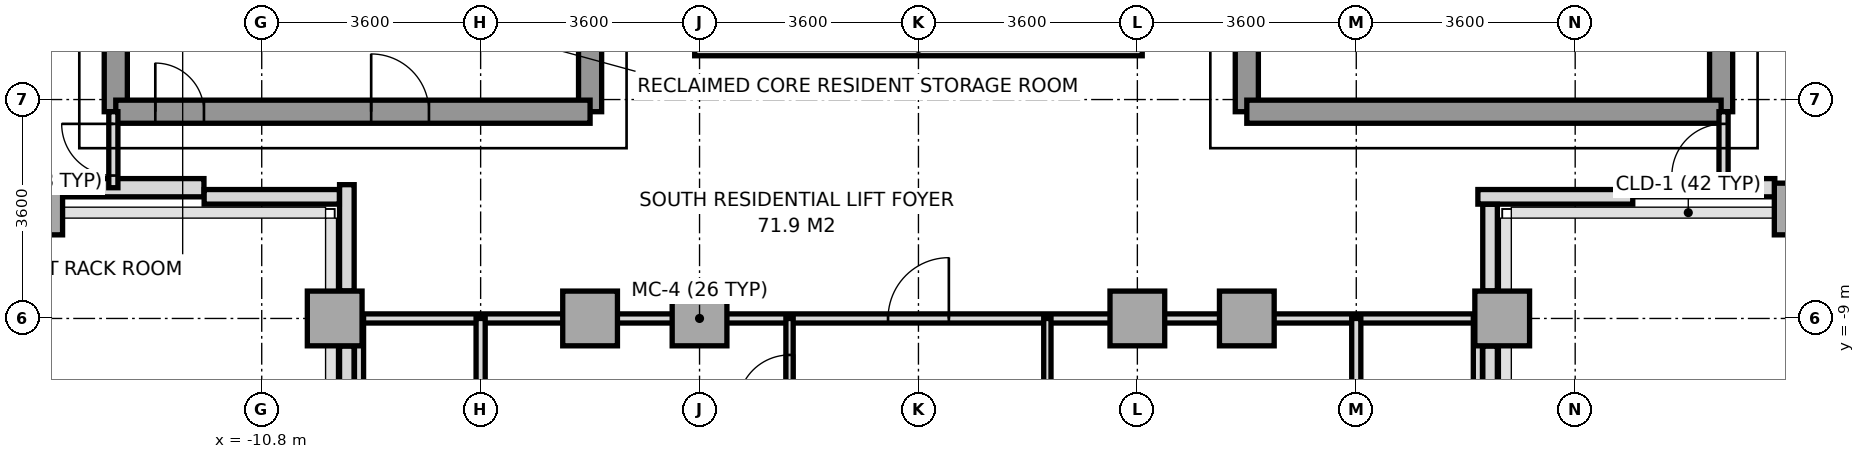
"""IFC4 building model, lengths in metres.
Left out: names, types, materials, properties, quantities, classifications, styles, units other than length and angle.
Written with IfcOpenShell. Run it as: python <this file> out.ifc"""

import sys

from ifc_helpers import new_model, si_unit, direction, frame, frame_2d, origin, origin_2d, place, context, subcontext, project, spatial, rectangle, extrude, source, transform, mapped, element, fill, save


model = new_model("IFC4")
c1 = context("Model", 3, precision=1e-05, world=origin(), true_north=direction((0.0, 1.0)))
c2 = subcontext(c1, "Body", "Model", "MODEL_VIEW")
j1 = project(units=[si_unit("LENGTHUNIT", "METRE"), si_unit("PLANEANGLEUNIT", "RADIAN")], contexts=[c1])
p1 = place(None, origin())
s1 = spatial("IfcSite", under=j1, at=p1, CompositionType="ELEMENT")
p2 = place(p1, origin())
s2 = spatial("IfcBuilding", under=s1, at=p2, CompositionType="ELEMENT")
p3 = place(p2, frame((0.0, 0.0, 211.4)))
s3 = spatial("IfcBuildingStorey", under=s2, at=p3, CompositionType="ELEMENT", Elevation=211.4)
m1 = source(origin(), c2, "Body", "SweptSolid", [
    extrude(rectangle(XDim=0.65, YDim=0.85, at=origin_2d()), origin(), (0.0, 0.0, 1.0), 3.14),
])
p4 = place(p3, frame((-14.4, -7.2, 0.0), z_axis=(0.0, 0.0, 1.0), x_axis=(1.0, 0.0, 0.0)))
e1 = element("IfcColumn", 1, at=p4, inside=s3, PredefinedType="COLUMN", context=c2, shape_type="MappedRepresentation", body=[
    mapped(m1, transform((0.0, 0.0, 0.0), x_axis=(1.0, 0.0, 0.0), y_axis=(0.0, 1.0, 0.0), z_axis=(0.0, 0.0, 1.0), scale=1.0)),
])
m2 = source(origin(), c2, "Body", "SweptSolid", [
    extrude(rectangle(XDim=0.9, YDim=0.9, at=origin_2d()), origin(), (0.0, 0.0, 1.0), 3.14),
])
for number, where, z_axis, x_axis in (
    (2, (-9.6, -9.0, 0.0), (0.0, 0.0, 1.0), (1.0, 0.0, 0.0)),
    (3, (-5.4, -9.0, 0.0), (0.0, 0.0, 1.0), (1.0, 0.0, 0.0)),
    (4, (-3.6, -9.0, 0.0), (0.0, 0.0, 1.0), (1.0, 0.0, 0.0)),
    (5, (3.6, -9.0, 0.0), (0.0, 0.0, 1.0), (1.0, 0.0, 0.0)),
    (6, (5.4, -9.0, 0.0), (0.0, 0.0, 1.0), (1.0, 0.0, 0.0)),
    (7, (9.6, -9.0, 0.0), (0.0, 0.0, 1.0), (1.0, 0.0, 0.0)),
):
    element("IfcColumn", number, at=place(p3, frame(where, z_axis=z_axis, x_axis=x_axis)), inside=s3, PredefinedType="COLUMN", context=c2, shape_type="MappedRepresentation", body=[
        mapped(m2, transform((0.0, 0.0, 0.0), x_axis=(1.0, 0.0, 0.0), y_axis=(0.0, 1.0, 0.0), z_axis=(0.0, 0.0, 1.0), scale=1.0)),
    ])
p5 = place(p3, frame((14.4, -7.2, 0.0), z_axis=(0.0, 0.0, 1.0), x_axis=(1.0, 0.0, 0.0)))
e8 = element("IfcColumn", 8, at=p5, inside=s3, PredefinedType="COLUMN", context=c2, shape_type="MappedRepresentation", body=[
    mapped(m1, transform((0.0, 0.0, 0.0), x_axis=(1.0, 0.0, 0.0), y_axis=(0.0, 1.0, 0.0), z_axis=(0.0, 0.0, 1.0), scale=1.0)),
])
for number, where, z_axis, x_axis in (
    (9, (-14.083, -6.85, 0.0), (0.0, 0.0, 1.0), (1.0, 0.0, 0.0)),
    (10, (11.75, -6.85, 0.0), (0.0, 0.0, 1.0), (1.0, 0.0, 0.0)),
):
    element("IfcWall", number, at=place(p3, frame(where, z_axis=z_axis, x_axis=x_axis)), inside=s3, PredefinedType="SOLIDWALL", context=c2, shape_type="SweptSolid", body=[
        extrude(rectangle(XDim=2.333, YDim=0.3, at=frame_2d((1.167, 0.0))), origin(), (0.0, 0.0, 1.0), 3.14),
    ])
p6 = place(p3, frame((11.747, -7.0, 0.0), z_axis=(0.0, 0.0, 1.0), x_axis=(-1.0, 0.0, 0.0)))
e11 = element("IfcWall", 11, at=p6, inside=s3, PredefinedType="PARAPET", context=c2, shape_type="SweptSolid", body=[
    extrude(rectangle(XDim=2.547, YDim=0.24, at=frame_2d((1.273, 0.0))), origin(), (0.0, 0.0, 1.0), 1.15),
])
p7 = place(p3, frame((9.4, -7.123, 0.0), z_axis=(0.0, 0.0, 1.0), x_axis=(0.0, -1.0, 0.0)))
e12 = element("IfcWall", 12, at=p7, inside=s3, PredefinedType="PARAPET", context=c2, shape_type="SweptSolid", body=[
    extrude(rectangle(XDim=1.424, YDim=0.24, at=frame_2d((0.712, 0.0))), origin(), (0.0, 0.0, 1.0), 1.15),
])
p8 = place(p3, frame((9.4, -9.453, 0.0), z_axis=(0.0, 0.0, 1.0), x_axis=(0.0, -1.0, 0.0)))
e13 = element("IfcWall", 13, at=p8, inside=s3, PredefinedType="PARAPET", context=c2, shape_type="SweptSolid", body=[
    extrude(rectangle(XDim=6.15, YDim=0.24, at=frame_2d((3.075, 0.0))), origin(), (0.0, 0.0, 1.0), 1.15),
])
p9 = place(p3, frame((-9.4, -15.358, 0.0), z_axis=(0.0, 0.0, 1.0), x_axis=(0.0, 1.0, 0.0)))
e14 = element("IfcWall", 14, at=p9, inside=s3, PredefinedType="PARAPET", context=c2, shape_type="SweptSolid", body=[
    extrude(rectangle(XDim=5.905, YDim=0.24, at=frame_2d((2.952, 0.0))), origin(), (0.0, 0.0, 1.0), 1.15),
])
p10 = place(p3, frame((-9.4, -8.547, 0.0), z_axis=(0.0, 0.0, 1.0), x_axis=(0.0, 1.0, 0.0)))
e15 = element("IfcWall", 15, at=p10, inside=s3, PredefinedType="PARAPET", context=c2, shape_type="SweptSolid", body=[
    extrude(rectangle(XDim=1.747, YDim=0.24, at=frame_2d((0.874, 0.0))), origin(), (0.0, 0.0, 1.0), 1.15),
])
p11 = place(p3, frame((-9.523, -7.0, 0.0), z_axis=(0.0, 0.0, 1.0), x_axis=(-1.0, 0.0, 0.0)))
e16 = element("IfcWall", 16, at=p11, inside=s3, PredefinedType="PARAPET", context=c2, shape_type="SweptSolid", body=[
    extrude(rectangle(XDim=2.224, YDim=0.24, at=frame_2d((1.112, 0.0))), origin(), (0.0, 0.0, 1.0), 1.15),
])
p12 = place(p3, frame((-13.2, -5.6, 0.0), z_axis=(0.0, 0.0, 1.0), x_axis=(0.0, 1.0, 0.0)))
e17 = element("IfcWall", 17, at=p12, inside=s3, PredefinedType="SHEAR", context=c2, shape_type="SweptSolid", body=[
    extrude(rectangle(XDim=11.2, YDim=0.38, at=frame_2d((5.6, 0.0))), origin(), (0.0, 0.0, 1.0), 3.14),
])
p13 = place(p3, frame((-5.4, -5.6, 0.0), z_axis=(0.0, 0.0, 1.0), x_axis=(0.0, 1.0, 0.0)))
e18 = element("IfcWall", 18, at=p13, inside=s3, PredefinedType="SHEAR", context=c2, shape_type="SweptSolid", body=[
    extrude(rectangle(XDim=12.5, YDim=0.38, at=frame_2d((6.25, 0.0))), origin(), (0.0, 0.0, 1.0), 3.14),
])
p14 = place(p13, frame((4.55, 0.0, 0.0)))
e19 = element("IfcOpeningElement", 19, at=p14, cuts=e18, PredefinedType="OPENING", context=c2, shape_type="SweptSolid", body=[
    extrude(rectangle(XDim=1.2, YDim=2.2, at=frame_2d((0.6, 1.1))), frame((0.0, 0.2, 0.0), z_axis=(0.0, -1.0, 0.0), x_axis=(1.0, 0.0, 0.0)), (0.0, 0.0, 1.0), 0.4),
])
p15 = place(p13, frame((10.45, 0.0, 0.0)))
e20 = element("IfcOpeningElement", 20, at=p15, cuts=e18, PredefinedType="OPENING", context=c2, shape_type="SweptSolid", body=[
    extrude(rectangle(XDim=1.2, YDim=2.2, at=frame_2d((0.6, 1.1))), frame((0.0, 0.2, 0.0), z_axis=(0.0, -1.0, 0.0), x_axis=(1.0, 0.0, 0.0)), (0.0, 0.0, 1.0), 0.4),
])
p16 = place(p13, frame((6.86, 0.0, 0.0)))
e21 = element("IfcOpeningElement", 21, at=p16, cuts=e18, PredefinedType="OPENING", context=c2, shape_type="SweptSolid", body=[
    extrude(rectangle(XDim=0.8, YDim=2.1, at=frame_2d((0.4, 1.05))), frame((0.0, 0.2, 0.0), z_axis=(0.0, -1.0, 0.0), x_axis=(1.0, 0.0, 0.0)), (0.0, 0.0, 1.0), 0.4),
])
p17 = place(p3, frame((-13.2, -5.6, 0.0), z_axis=(0.0, 0.0, 1.0), x_axis=(1.0, 0.0, 0.0)))
e22 = element("IfcWall", 22, at=p17, inside=s3, PredefinedType="SHEAR", context=c2, shape_type="SweptSolid", body=[
    extrude(rectangle(XDim=7.8, YDim=0.38, at=frame_2d((3.9, 0.0))), origin(), (0.0, 0.0, 1.0), 3.14),
])
p18 = place(p17, frame((0.65, 0.0, 0.0)))
e23 = element("IfcOpeningElement", 23, at=p18, cuts=e22, PredefinedType="OPENING", context=c2, shape_type="SweptSolid", body=[
    extrude(rectangle(XDim=0.8, YDim=2.1, at=frame_2d((0.4, 1.05))), frame((0.0, 0.2, 0.0), z_axis=(0.0, -1.0, 0.0), x_axis=(1.0, 0.0, 0.0)), (0.0, 0.0, 1.0), 0.4),
])
p19 = place(p17, frame((4.2, 0.0, 0.0)))
e24 = element("IfcOpeningElement", 24, at=p19, cuts=e22, PredefinedType="OPENING", context=c2, shape_type="SweptSolid", body=[
    extrude(rectangle(XDim=0.95, YDim=2.15, at=frame_2d((0.475, 1.075))), frame((0.0, 0.2, 0.0), z_axis=(0.0, -1.0, 0.0), x_axis=(1.0, 0.0, 0.0)), (0.0, 0.0, 1.0), 0.4),
])
p20 = place(p3, frame((13.2, -5.6, 0.0), z_axis=(0.0, 0.0, 1.0), x_axis=(0.0, 1.0, 0.0)))
e25 = element("IfcWall", 25, at=p20, inside=s3, PredefinedType="SHEAR", context=c2, shape_type="SweptSolid", body=[
    extrude(rectangle(XDim=11.2, YDim=0.38, at=frame_2d((5.6, 0.0))), origin(), (0.0, 0.0, 1.0), 3.14),
])
p21 = place(p3, frame((5.4, -5.6, 0.0), z_axis=(0.0, 0.0, 1.0), x_axis=(0.0, 1.0, 0.0)))
e26 = element("IfcWall", 26, at=p21, inside=s3, PredefinedType="SHEAR", context=c2, shape_type="SweptSolid", body=[
    extrude(rectangle(XDim=12.5, YDim=0.38, at=frame_2d((6.25, 0.0))), origin(), (0.0, 0.0, 1.0), 3.14),
])
p22 = place(p21, frame((4.55, 0.0, 0.0)))
e27 = element("IfcOpeningElement", 27, at=p22, cuts=e26, PredefinedType="OPENING", context=c2, shape_type="SweptSolid", body=[
    extrude(rectangle(XDim=1.2, YDim=2.2, at=frame_2d((0.6, 1.1))), frame((0.0, 0.2, 0.0), z_axis=(0.0, -1.0, 0.0), x_axis=(1.0, 0.0, 0.0)), (0.0, 0.0, 1.0), 0.4),
])
p23 = place(p21, frame((10.45, 0.0, 0.0)))
e28 = element("IfcOpeningElement", 28, at=p23, cuts=e26, PredefinedType="OPENING", context=c2, shape_type="SweptSolid", body=[
    extrude(rectangle(XDim=1.2, YDim=2.2, at=frame_2d((0.6, 1.1))), frame((0.0, 0.2, 0.0), z_axis=(0.0, -1.0, 0.0), x_axis=(1.0, 0.0, 0.0)), (0.0, 0.0, 1.0), 0.4),
])
p24 = place(p21, frame((6.86, 0.0, 0.0)))
e29 = element("IfcOpeningElement", 29, at=p24, cuts=e26, PredefinedType="OPENING", context=c2, shape_type="SweptSolid", body=[
    extrude(rectangle(XDim=0.8, YDim=2.1, at=frame_2d((0.4, 1.05))), frame((0.0, 0.2, 0.0), z_axis=(0.0, -1.0, 0.0), x_axis=(1.0, 0.0, 0.0)), (0.0, 0.0, 1.0), 0.4),
])
p25 = place(p3, frame((5.4, -5.6, 0.0), z_axis=(0.0, 0.0, 1.0), x_axis=(1.0, 0.0, 0.0)))
e30 = element("IfcWall", 30, at=p25, inside=s3, PredefinedType="SHEAR", context=c2, shape_type="SweptSolid", body=[
    extrude(rectangle(XDim=7.8, YDim=0.38, at=frame_2d((3.9, 0.0))), origin(), (0.0, 0.0, 1.0), 3.14),
])
p26 = place(p3, frame((-9.55, -9.0, 0.0), z_axis=(0.0, 0.0, 1.0), x_axis=(1.0, 0.0, 0.0)))
e31 = element("IfcWall", 31, at=p26, inside=s3, PredefinedType="PARTITIONING", context=c2, shape_type="SweptSolid", body=[
    extrude(rectangle(XDim=19.1, YDim=0.15, at=frame_2d((9.55, 0.0))), origin(), (0.0, 0.0, 1.0), 2.69),
])
p27 = place(p26, frame((9.05, 0.0, 0.0)))
e32 = element("IfcOpeningElement", 32, at=p27, cuts=e31, PredefinedType="OPENING", context=c2, shape_type="SweptSolid", body=[
    extrude(rectangle(XDim=1.0, YDim=2.2, at=frame_2d((0.5, 1.1))), frame((0.0, 0.085, 0.0), z_axis=(0.0, -1.0, 0.0), x_axis=(1.0, 0.0, 0.0)), (0.0, 0.0, 1.0), 0.17),
])
for number, where, z_axis, x_axis in (
    (33, (-9.2, -15.68, 0.0), (0.0, 0.0, 1.0), (0.0, 1.0, 0.0)),
    (34, (9.2, -15.68, 0.0), (0.0, 0.0, 1.0), (0.0, 1.0, 0.0)),
):
    element("IfcWall", number, at=place(p3, frame(where, z_axis=z_axis, x_axis=x_axis)), inside=s3, PredefinedType="PARTITIONING", context=c2, shape_type="SweptSolid", body=[
        extrude(rectangle(XDim=6.68, YDim=0.15, at=frame_2d((3.34, 0.0))), origin(), (0.0, 0.0, 1.0), 2.69),
    ])
for number, where, z_axis, x_axis in (
    (35, (-7.2, -21.02, 0.0), (0.0, 0.0, 1.0), (0.0, 1.0, 0.0)),
    (36, (7.2, -21.02, 0.0), (0.0, 0.0, 1.0), (0.0, 1.0, 0.0)),
):
    element("IfcWall", number, at=place(p3, frame(where, z_axis=z_axis, x_axis=x_axis)), inside=s3, PredefinedType="PARTITIONING", context=c2, shape_type="SweptSolid", body=[
        extrude(rectangle(XDim=12.02, YDim=0.15, at=frame_2d((6.01, 0.0))), origin(), (0.0, 0.0, 1.0), 2.69),
    ])
p28 = place(p3, frame((-2.12, -18.0, 0.0), z_axis=(0.0, 0.0, 1.0), x_axis=(0.0, 1.0, 0.0)))
e37 = element("IfcWall", 37, at=p28, inside=s3, PredefinedType="PARTITIONING", context=c2, shape_type="SweptSolid", body=[
    extrude(rectangle(XDim=9.0, YDim=0.12, at=frame_2d((4.5, 0.0))), origin(), (0.0, 0.0, 1.0), 2.69),
])
p29 = place(p28, frame((7.55, 0.0, 0.0)))
e38 = element("IfcOpeningElement", 38, at=p29, cuts=e37, PredefinedType="OPENING", context=c2, shape_type="SweptSolid", body=[
    extrude(rectangle(XDim=0.85, YDim=2.1, at=frame_2d((0.425, 1.05))), frame((0.0, 0.07, 0.0), z_axis=(0.0, -1.0, 0.0), x_axis=(1.0, 0.0, 0.0)), (0.0, 0.0, 1.0), 0.14),
])
p30 = place(p28, frame((0.5, 0.0, 0.0)))
e39 = element("IfcOpeningElement", 39, at=p30, cuts=e37, PredefinedType="OPENING", context=c2, shape_type="SweptSolid", body=[
    extrude(rectangle(XDim=0.95, YDim=2.15, at=frame_2d((0.475, 1.075))), frame((0.0, 0.07, 0.0), z_axis=(0.0, -1.0, 0.0), x_axis=(1.0, 0.0, 0.0)), (0.0, 0.0, 1.0), 0.14),
])
p31 = place(p3, frame((2.12, -18.0, 0.0), z_axis=(0.0, 0.0, 1.0), x_axis=(0.0, 1.0, 0.0)))
e40 = element("IfcWall", 40, at=p31, inside=s3, PredefinedType="PARTITIONING", context=c2, shape_type="SweptSolid", body=[
    extrude(rectangle(XDim=9.0, YDim=0.12, at=frame_2d((4.5, 0.0))), origin(), (0.0, 0.0, 1.0), 2.69),
])
p32 = place(p31, frame((1.6, 0.0, 0.0)))
e41 = element("IfcOpeningElement", 41, at=p32, cuts=e40, PredefinedType="OPENING", context=c2, shape_type="SweptSolid", body=[
    extrude(rectangle(XDim=0.95, YDim=2.15, at=frame_2d((0.475, 1.075))), frame((0.0, 0.07, 0.0), z_axis=(0.0, -1.0, 0.0), x_axis=(1.0, 0.0, 0.0)), (0.0, 0.0, 1.0), 0.14),
])
p33 = place(p3, frame((-13.24, -6.85, 0.0), z_axis=(0.0, 0.0, 1.0), x_axis=(0.0, 1.0, 0.0)))
e42 = element("IfcWall", 42, at=p33, inside=s3, PredefinedType="PARTITIONING", context=c2, shape_type="SweptSolid", body=[
    extrude(rectangle(XDim=1.25, YDim=0.15, at=frame_2d((0.625, 0.0))), origin(), (0.0, 0.0, 1.0), 3.14),
])
p34 = place(p33, frame((0.2, 0.0, 0.0)))
e43 = element("IfcOpeningElement", 43, at=p34, cuts=e42, PredefinedType="OPENING", context=c2, shape_type="SweptSolid", body=[
    extrude(rectangle(XDim=0.85, YDim=2.1, at=frame_2d((0.425, 1.05))), frame((0.0, 0.085, 0.0), z_axis=(0.0, -1.0, 0.0), x_axis=(1.0, 0.0, 0.0)), (0.0, 0.0, 1.0), 0.17),
])
p35 = place(p3, frame((13.24, -6.85, 0.0), z_axis=(0.0, 0.0, 1.0), x_axis=(0.0, 1.0, 0.0)))
e44 = element("IfcWall", 44, at=p35, inside=s3, PredefinedType="PARTITIONING", context=c2, shape_type="SweptSolid", body=[
    extrude(rectangle(XDim=1.25, YDim=0.15, at=frame_2d((0.625, 0.0))), origin(), (0.0, 0.0, 1.0), 3.14),
])
p36 = place(p35, frame((0.2, 0.0, 0.0)))
e45 = element("IfcOpeningElement", 45, at=p36, cuts=e44, PredefinedType="OPENING", context=c2, shape_type="SweptSolid", body=[
    extrude(rectangle(XDim=0.85, YDim=2.1, at=frame_2d((0.425, 1.05))), frame((0.0, 0.085, 0.0), z_axis=(0.0, -1.0, 0.0), x_axis=(1.0, 0.0, 0.0)), (0.0, 0.0, 1.0), 0.17),
])
p37 = place(p3, frame((-3.68, -4.56, 0.0), z_axis=(0.0, 0.0, 1.0), x_axis=(1.0, 0.0, 0.0)))
e46 = element("IfcWall", 46, at=p37, inside=s3, PredefinedType="PARAPET", context=c2, shape_type="SweptSolid", body=[
    extrude(rectangle(XDim=7.36, YDim=0.24, at=frame_2d((3.68, 0.0))), origin(), (0.0, 0.0, 1.0), 1.15),
])
m3 = source(origin(), c2, "Body", "SweptSolid", [
    extrude(rectangle(XDim=0.8, YDim=2.1, at=frame_2d((0.4, 1.05))), frame((0.0, 0.025, 0.0), z_axis=(0.0, -1.0, 0.0), x_axis=(1.0, 0.0, 0.0)), (0.0, 0.0, 1.0), 0.05),
])
p38 = place(p18, origin())
e47 = element("IfcDoor", 47, at=p38, inside=s3, OperationType="SINGLE_SWING_LEFT", PredefinedType="DOOR", context=c2, shape_type="MappedRepresentation", body=[
    mapped(m3, transform((0.0, 0.0, 0.0), x_axis=(1.0, 0.0, 0.0), y_axis=(0.0, 1.0, 0.0), z_axis=(0.0, 0.0, 1.0), scale=1.0)),
])
fill(e23, e47)
m4 = source(origin(), c2, "Body", "SweptSolid", [
    extrude(rectangle(XDim=0.95, YDim=2.15, at=frame_2d((0.475, 1.075))), frame((0.0, 0.025, 0.0), z_axis=(0.0, -1.0, 0.0), x_axis=(1.0, 0.0, 0.0)), (0.0, 0.0, 1.0), 0.05),
])
p39 = place(p19, origin())
e48 = element("IfcDoor", 48, at=p39, inside=s3, OperationType="SINGLE_SWING_LEFT", PredefinedType="DOOR", context=c2, shape_type="MappedRepresentation", body=[
    mapped(m4, transform((0.0, 0.0, 0.0), x_axis=(1.0, 0.0, 0.0), y_axis=(0.0, 1.0, 0.0), z_axis=(0.0, 0.0, 1.0), scale=1.0)),
])
fill(e24, e48)
m5 = source(origin(), c2, "Body", "SweptSolid", [
    extrude(rectangle(XDim=1.0, YDim=2.2, at=frame_2d((0.5, 1.1))), frame((0.0, 0.025, 0.0), z_axis=(0.0, -1.0, 0.0), x_axis=(1.0, 0.0, 0.0)), (0.0, 0.0, 1.0), 0.05),
])
p40 = place(p27, origin())
e49 = element("IfcDoor", 49, at=p40, inside=s3, OperationType="SINGLE_SWING_RIGHT", PredefinedType="DOOR", context=c2, shape_type="MappedRepresentation", body=[
    mapped(m5, transform((0.0, 0.0, 0.0), x_axis=(1.0, 0.0, 0.0), y_axis=(0.0, 1.0, 0.0), z_axis=(0.0, 0.0, 1.0), scale=1.0)),
])
fill(e32, e49)
m6 = source(origin(), c2, "Body", "SweptSolid", [
    extrude(rectangle(XDim=0.85, YDim=2.1, at=frame_2d((0.425, 1.05))), frame((0.0, 0.025, 0.0), z_axis=(0.0, -1.0, 0.0), x_axis=(1.0, 0.0, 0.0)), (0.0, 0.0, 1.0), 0.05),
])
p41 = place(p29, origin())
e50 = element("IfcDoor", 50, at=p41, inside=s3, OperationType="SINGLE_SWING_LEFT", PredefinedType="DOOR", context=c2, shape_type="MappedRepresentation", body=[
    mapped(m6, transform((0.0, 0.0, 0.0), x_axis=(1.0, 0.0, 0.0), y_axis=(0.0, 1.0, 0.0), z_axis=(0.0, 0.0, 1.0), scale=1.0)),
])
fill(e38, e50)
p42 = place(p34, origin())
e51 = element("IfcDoor", 51, at=p42, inside=s3, OperationType="SINGLE_SWING_RIGHT", PredefinedType="DOOR", context=c2, shape_type="MappedRepresentation", body=[
    mapped(m6, transform((0.0, 0.0, 0.0), x_axis=(1.0, 0.0, 0.0), y_axis=(0.0, 1.0, 0.0), z_axis=(0.0, 0.0, 1.0), scale=1.0)),
])
fill(e43, e51)
p43 = place(p36, origin())
e52 = element("IfcDoor", 52, at=p43, inside=s3, OperationType="SINGLE_SWING_LEFT", PredefinedType="DOOR", context=c2, shape_type="MappedRepresentation", body=[
    mapped(m6, transform((0.0, 0.0, 0.0), x_axis=(1.0, 0.0, 0.0), y_axis=(0.0, 1.0, 0.0), z_axis=(0.0, 0.0, 1.0), scale=1.0)),
])
fill(e45, e52)
save(model, sys.argv[1])
